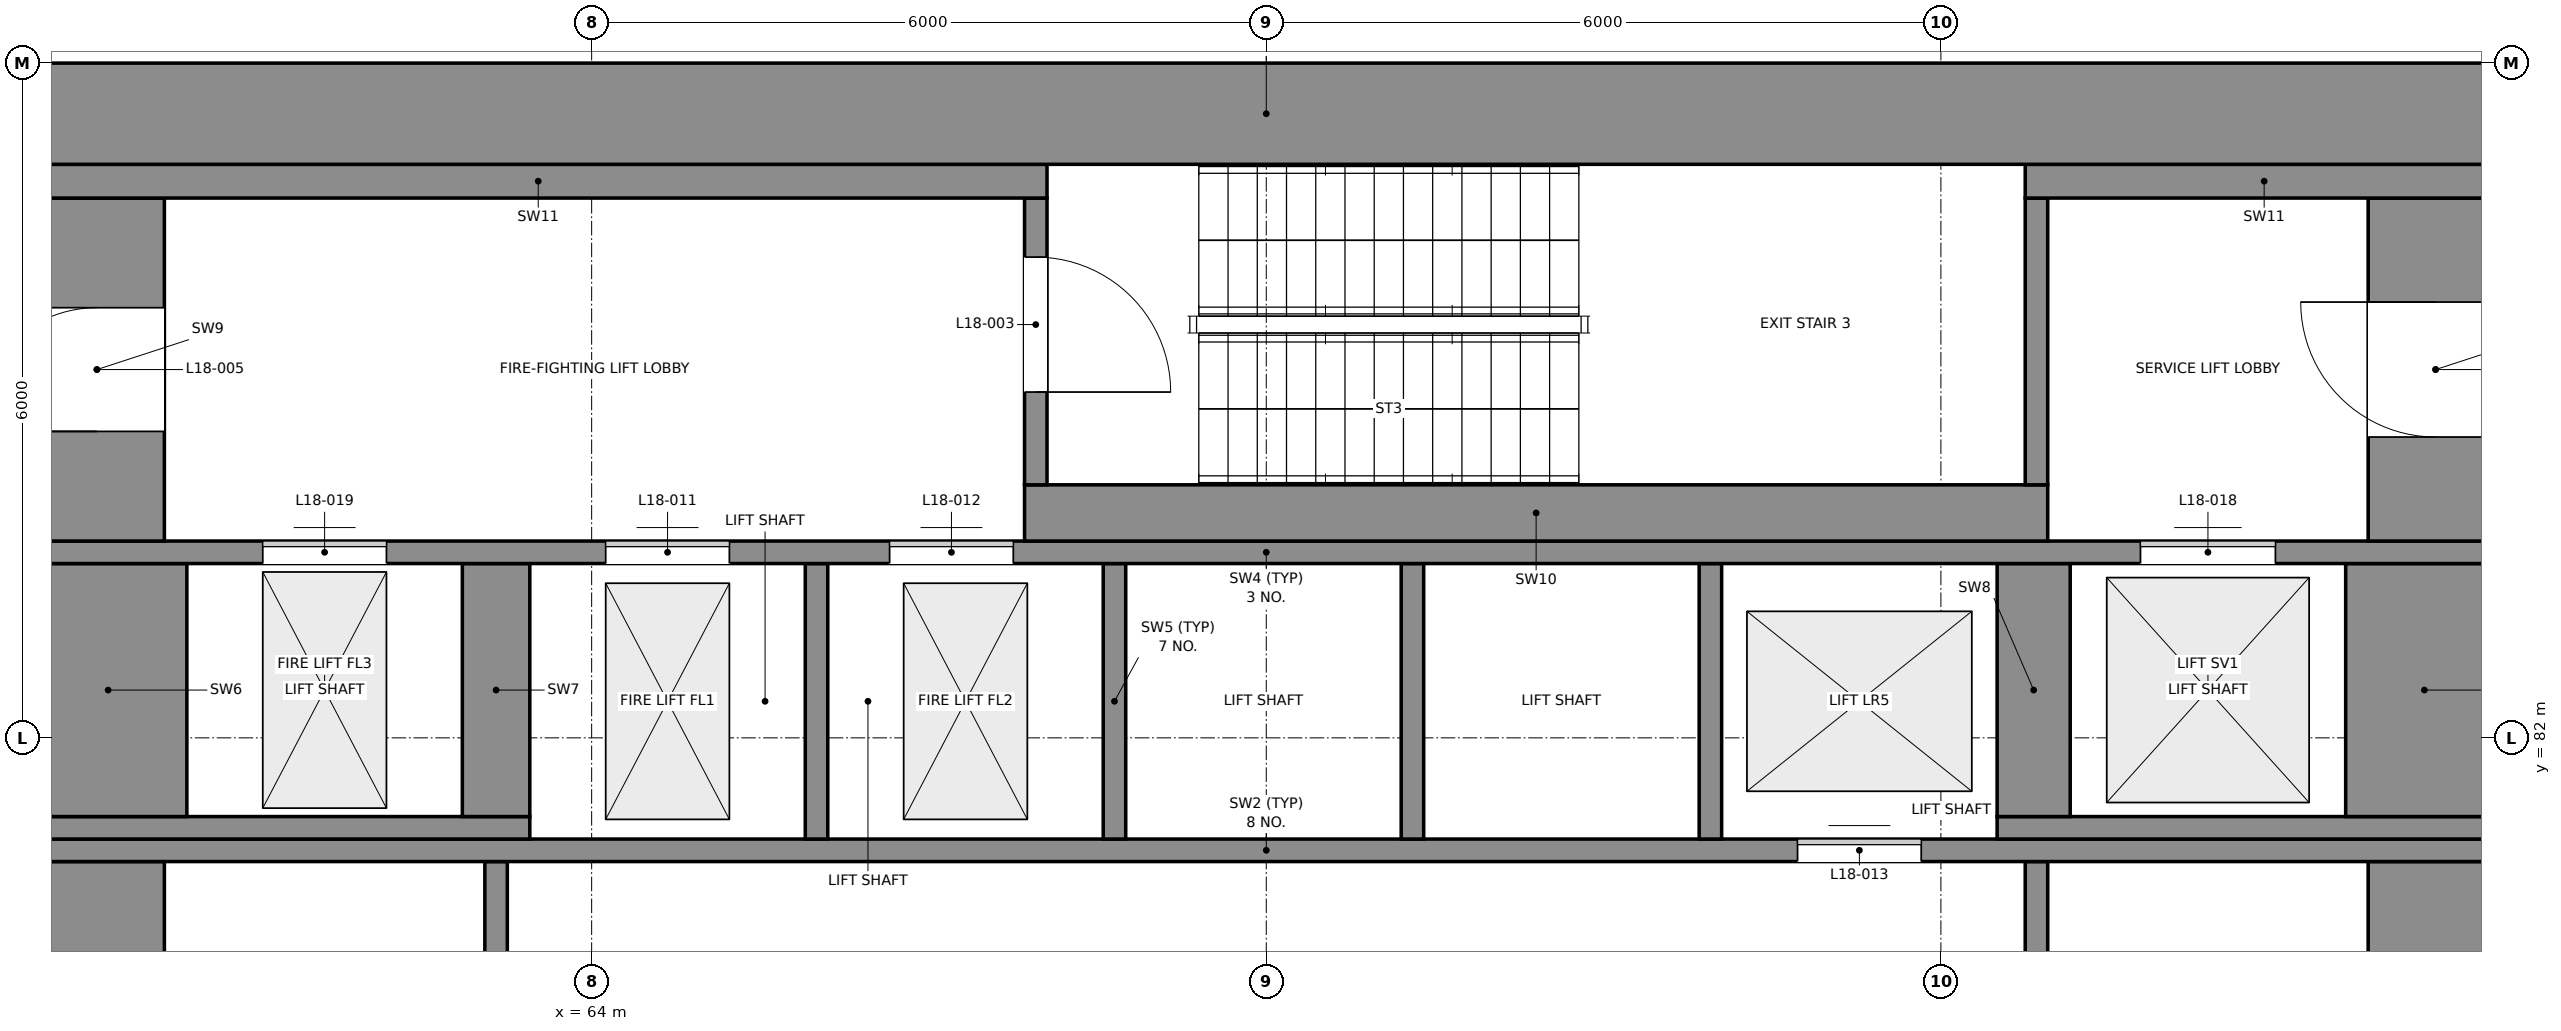
"""IFC4 building model, lengths in metres.
Left out: names, types, materials, properties, quantities, classifications, styles, units other than length and angle.
Written with IfcOpenShell. Run it as: python <this file> out.ifc"""

import sys

from ifc_helpers import new_model, si_unit, direction, frame, frame_2d, origin, place, context, subcontext, project, spatial, rectangle, extrude, element, fill, save


model = new_model("IFC4")
c1 = context("Model", 3, precision=1e-05, world=origin(), true_north=direction((0.0, 1.0)))
c2 = subcontext(c1, "Body", "Model", "MODEL_VIEW")
j1 = project(units=[si_unit("LENGTHUNIT", "METRE"), si_unit("PLANEANGLEUNIT", "RADIAN")], contexts=[c1])
p1 = place(None, origin())
s1 = spatial("IfcSite", under=j1, at=p1, CompositionType="ELEMENT")
p2 = place(p1, origin())
s2 = spatial("IfcBuilding", under=s1, at=p2, CompositionType="ELEMENT")
p3 = place(p2, frame((0.0, 0.0, 85.8)))
s3 = spatial("IfcBuildingStorey", under=s2, at=p3, CompositionType="ELEMENT", Elevation=85.8)
for number, where, z_axis, x_axis in (
    (1, (59.6, 72.2, 0.0), (0.0, 0.0, 1.0), (0.0, 1.0, 0.0)),
    (2, (80.4, 72.2, 0.0), (0.0, 0.0, 1.0), (0.0, 1.0, 0.0)),
):
    element("IfcWall", number, at=place(p3, frame(where, z_axis=z_axis, x_axis=x_axis)), inside=s3, PredefinedType="SHEAR", context=c2, shape_type="SweptSolid", body=[
        extrude(rectangle(XDim=8.7, YDim=1.2, at=frame_2d((4.35, 0.0))), origin(), (0.0, 0.0, 1.0), 5.0),
    ])
for number, where, z_axis, x_axis in (
    (3, (63.15, 77.7, 0.0), (0.0, 0.0, 1.0), (0.0, 1.0, 0.0)),
    (4, (76.85, 77.7, 0.0), (0.0, 0.0, 1.0), (0.0, 1.0, 0.0)),
):
    element("IfcWall", number, at=place(p3, frame(where, z_axis=z_axis, x_axis=x_axis)), inside=s3, PredefinedType="SHEAR", context=c2, shape_type="SweptSolid", body=[
        extrude(rectangle(XDim=3.2, YDim=0.2, at=frame_2d((1.6, 0.0))), origin(), (0.0, 0.0, 1.0), 5.0),
    ])
p4 = place(p3, frame((59.0, 81.0, 0.0), z_axis=(0.0, 0.0, 1.0), x_axis=(1.0, 0.0, 0.0)))
e5 = element("IfcWall", 5, at=p4, inside=s3, PredefinedType="SHEAR", context=c2, shape_type="SweptSolid", body=[
    extrude(rectangle(XDim=22.0, YDim=0.2, at=frame_2d((11.0, 0.0))), origin(), (0.0, 0.0, 1.0), 5.0),
])
p5 = place(p4, frame((15.725, 0.0, 0.0)))
e6 = element("IfcOpeningElement", 6, at=p5, cuts=e5, PredefinedType="OPENING", context=c2, shape_type="SweptSolid", body=[
    extrude(rectangle(XDim=1.1, YDim=2.1, at=frame_2d((0.55, 1.05))), frame((0.0, 0.11, 0.0), z_axis=(0.0, -1.0, 0.0), x_axis=(1.0, 0.0, 0.0)), (0.0, 0.0, 1.0), 0.22),
])
p6 = place(p3, frame((59.0, 81.2, 0.0), z_axis=(0.0, 0.0, 1.0), x_axis=(1.0, 0.0, 0.0)))
e7 = element("IfcWall", 7, at=p6, inside=s3, PredefinedType="SHEAR", context=c2, shape_type="SweptSolid", body=[
    extrude(rectangle(XDim=4.45, YDim=0.2, at=frame_2d((2.225, 0.0))), origin(), (0.0, 0.0, 1.0), 5.0),
])
for number, where, z_axis, x_axis in (
    (8, (66.0, 81.1, 0.0), (0.0, 0.0, 1.0), (0.0, 1.0, 0.0)),
    (9, (68.65, 81.1, 0.0), (0.0, 0.0, 1.0), (0.0, 1.0, 0.0)),
    (10, (71.3, 81.1, 0.0), (0.0, 0.0, 1.0), (0.0, 1.0, 0.0)),
    (11, (73.95, 81.1, 0.0), (0.0, 0.0, 1.0), (0.0, 1.0, 0.0)),
):
    element("IfcWall", number, at=place(p3, frame(where, z_axis=z_axis, x_axis=x_axis)), inside=s3, PredefinedType="SHEAR", context=c2, shape_type="SweptSolid", body=[
        extrude(rectangle(XDim=2.45, YDim=0.2, at=frame_2d((1.225, 0.0))), origin(), (0.0, 0.0, 1.0), 5.0),
    ])
p7 = place(p3, frame((76.5, 81.2, 0.0), z_axis=(0.0, 0.0, 1.0), x_axis=(1.0, 0.0, 0.0)))
e12 = element("IfcWall", 12, at=p7, inside=s3, PredefinedType="SHEAR", context=c2, shape_type="SweptSolid", body=[
    extrude(rectangle(XDim=4.5, YDim=0.2, at=frame_2d((2.25, 0.0))), origin(), (0.0, 0.0, 1.0), 5.0),
])
p8 = place(p3, frame((59.7, 81.3, 0.0), z_axis=(0.0, 0.0, 1.0), x_axis=(0.0, 1.0, 0.0)))
e13 = element("IfcWall", 13, at=p8, inside=s3, PredefinedType="SHEAR", context=c2, shape_type="SweptSolid", body=[
    extrude(rectangle(XDim=2.25, YDim=1.4, at=frame_2d((1.125, 0.0))), origin(), (0.0, 0.0, 1.0), 5.0),
])
p9 = place(p3, frame((63.15, 81.3, 0.0), z_axis=(0.0, 0.0, 1.0), x_axis=(0.0, 1.0, 0.0)))
e14 = element("IfcWall", 14, at=p9, inside=s3, PredefinedType="SHEAR", context=c2, shape_type="SweptSolid", body=[
    extrude(rectangle(XDim=2.25, YDim=0.6, at=frame_2d((1.125, 0.0))), origin(), (0.0, 0.0, 1.0), 5.0),
])
p10 = place(p3, frame((76.825, 81.3, 0.0), z_axis=(0.0, 0.0, 1.0), x_axis=(0.0, 1.0, 0.0)))
e15 = element("IfcWall", 15, at=p10, inside=s3, PredefinedType="SHEAR", context=c2, shape_type="SweptSolid", body=[
    extrude(rectangle(XDim=2.25, YDim=0.65, at=frame_2d((1.125, 0.0))), origin(), (0.0, 0.0, 1.0), 5.0),
])
p11 = place(p3, frame((80.3, 81.3, 0.0), z_axis=(0.0, 0.0, 1.0), x_axis=(0.0, 1.0, 0.0)))
e16 = element("IfcWall", 16, at=p11, inside=s3, PredefinedType="SHEAR", context=c2, shape_type="SweptSolid", body=[
    extrude(rectangle(XDim=2.25, YDim=1.4, at=frame_2d((1.125, 0.0))), origin(), (0.0, 0.0, 1.0), 5.0),
])
p12 = place(p3, frame((59.0, 83.65, 0.0), z_axis=(0.0, 0.0, 1.0), x_axis=(1.0, 0.0, 0.0)))
e17 = element("IfcWall", 17, at=p12, inside=s3, PredefinedType="SHEAR", context=c2, shape_type="SweptSolid", body=[
    extrude(rectangle(XDim=22.0, YDim=0.2, at=frame_2d((11.0, 0.0))), origin(), (0.0, 0.0, 1.0), 5.0),
])
p13 = place(p12, frame((5.125, 0.0, 0.0)))
e18 = element("IfcOpeningElement", 18, at=p13, cuts=e17, PredefinedType="OPENING", context=c2, shape_type="SweptSolid", body=[
    extrude(rectangle(XDim=1.1, YDim=2.1, at=frame_2d((0.55, 1.05))), frame((0.0, 0.11, 0.0), z_axis=(0.0, -1.0, 0.0), x_axis=(1.0, 0.0, 0.0)), (0.0, 0.0, 1.0), 0.22),
])
p14 = place(p12, frame((7.65, 0.0, 0.0)))
e19 = element("IfcOpeningElement", 19, at=p14, cuts=e17, PredefinedType="OPENING", context=c2, shape_type="SweptSolid", body=[
    extrude(rectangle(XDim=1.1, YDim=2.1, at=frame_2d((0.55, 1.05))), frame((0.0, 0.11, 0.0), z_axis=(0.0, -1.0, 0.0), x_axis=(1.0, 0.0, 0.0)), (0.0, 0.0, 1.0), 0.22),
])
p15 = place(p12, frame((18.775, 0.0, 0.0)))
e20 = element("IfcOpeningElement", 20, at=p15, cuts=e17, PredefinedType="OPENING", context=c2, shape_type="SweptSolid", body=[
    extrude(rectangle(XDim=1.2, YDim=2.1, at=frame_2d((0.6, 1.05))), frame((0.0, 0.11, 0.0), z_axis=(0.0, -1.0, 0.0), x_axis=(1.0, 0.0, 0.0)), (0.0, 0.0, 1.0), 0.22),
])
p16 = place(p12, frame((2.075, 0.0, 0.0)))
e21 = element("IfcOpeningElement", 21, at=p16, cuts=e17, PredefinedType="OPENING", context=c2, shape_type="SweptSolid", body=[
    extrude(rectangle(XDim=1.1, YDim=2.1, at=frame_2d((0.55, 1.05))), frame((0.0, 0.11, 0.0), z_axis=(0.0, -1.0, 0.0), x_axis=(1.0, 0.0, 0.0)), (0.0, 0.0, 1.0), 0.22),
])
p17 = place(p3, frame((59.6, 83.75, 0.0), z_axis=(0.0, 0.0, 1.0), x_axis=(0.0, 1.0, 0.0)))
e22 = element("IfcWall", 22, at=p17, inside=s3, PredefinedType="SHEAR", context=c2, shape_type="SweptSolid", body=[
    extrude(rectangle(XDim=3.05, YDim=1.2, at=frame_2d((1.525, 0.0))), origin(), (0.0, 0.0, 1.0), 5.0),
])
p18 = place(p17, frame((0.975, 0.0, 0.0)))
e23 = element("IfcOpeningElement", 23, at=p18, cuts=e22, PredefinedType="OPENING", context=c2, shape_type="SweptSolid", body=[
    extrude(rectangle(XDim=1.1, YDim=2.1, at=frame_2d((0.55, 1.05))), frame((0.0, 0.61, 0.0), z_axis=(0.0, -1.0, 0.0), x_axis=(1.0, 0.0, 0.0)), (0.0, 0.0, 1.0), 1.22),
])
p19 = place(p3, frame((67.85, 84.0, 0.0), z_axis=(0.0, 0.0, 1.0), x_axis=(1.0, 0.0, 0.0)))
e24 = element("IfcWall", 24, at=p19, inside=s3, PredefinedType="SHEAR", context=c2, shape_type="SweptSolid", body=[
    extrude(rectangle(XDim=9.1, YDim=0.5, at=frame_2d((4.55, 0.0))), origin(), (0.0, 0.0, 1.0), 5.0),
])
p20 = place(p3, frame((80.4, 83.75, 0.0), z_axis=(0.0, 0.0, 1.0), x_axis=(0.0, 1.0, 0.0)))
e25 = element("IfcWall", 25, at=p20, inside=s3, PredefinedType="SHEAR", context=c2, shape_type="SweptSolid", body=[
    extrude(rectangle(XDim=3.05, YDim=1.2, at=frame_2d((1.525, 0.0))), origin(), (0.0, 0.0, 1.0), 5.0),
])
p21 = place(p20, frame((0.925, 0.0, 0.0)))
e26 = element("IfcOpeningElement", 26, at=p21, cuts=e25, PredefinedType="OPENING", context=c2, shape_type="SweptSolid", body=[
    extrude(rectangle(XDim=1.2, YDim=2.1, at=frame_2d((0.6, 1.05))), frame((0.0, 0.61, 0.0), z_axis=(0.0, -1.0, 0.0), x_axis=(1.0, 0.0, 0.0)), (0.0, 0.0, 1.0), 1.22),
])
p22 = place(p3, frame((67.95, 84.25, 0.0), z_axis=(0.0, 0.0, 1.0), x_axis=(0.0, 1.0, 0.0)))
e27 = element("IfcWall", 27, at=p22, inside=s3, PredefinedType="SHEAR", context=c2, shape_type="SweptSolid", body=[
    extrude(rectangle(XDim=2.55, YDim=0.2, at=frame_2d((1.275, 0.0))), origin(), (0.0, 0.0, 1.0), 5.0),
])
p23 = place(p22, frame((0.825, 0.0, 0.0)))
e28 = element("IfcOpeningElement", 28, at=p23, cuts=e27, PredefinedType="OPENING", context=c2, shape_type="SweptSolid", body=[
    extrude(rectangle(XDim=1.2, YDim=2.1, at=frame_2d((0.6, 1.05))), frame((0.0, 0.11, 0.0), z_axis=(0.0, -1.0, 0.0), x_axis=(1.0, 0.0, 0.0)), (0.0, 0.0, 1.0), 0.22),
])
p24 = place(p3, frame((76.85, 84.25, 0.0), z_axis=(0.0, 0.0, 1.0), x_axis=(0.0, 1.0, 0.0)))
e29 = element("IfcWall", 29, at=p24, inside=s3, PredefinedType="SHEAR", context=c2, shape_type="SweptSolid", body=[
    extrude(rectangle(XDim=2.55, YDim=0.2, at=frame_2d((1.275, 0.0))), origin(), (0.0, 0.0, 1.0), 5.0),
])
p25 = place(p3, frame((59.0, 86.95, 0.0), z_axis=(0.0, 0.0, 1.0), x_axis=(1.0, 0.0, 0.0)))
e30 = element("IfcWall", 30, at=p25, inside=s3, PredefinedType="SHEAR", context=c2, shape_type="SweptSolid", body=[
    extrude(rectangle(XDim=9.05, YDim=0.3, at=frame_2d((4.525, 0.0))), origin(), (0.0, 0.0, 1.0), 5.0),
])
p26 = place(p3, frame((76.75, 86.95, 0.0), z_axis=(0.0, 0.0, 1.0), x_axis=(1.0, 0.0, 0.0)))
e31 = element("IfcWall", 31, at=p26, inside=s3, PredefinedType="SHEAR", context=c2, shape_type="SweptSolid", body=[
    extrude(rectangle(XDim=4.25, YDim=0.3, at=frame_2d((2.125, 0.0))), origin(), (0.0, 0.0, 1.0), 5.0),
])
p27 = place(p3, frame((59.0, 87.55, 0.0), z_axis=(0.0, 0.0, 1.0), x_axis=(1.0, 0.0, 0.0)))
e32 = element("IfcWall", 32, at=p27, inside=s3, PredefinedType="SHEAR", context=c2, shape_type="SweptSolid", body=[
    extrude(rectangle(XDim=22.0, YDim=0.9, at=frame_2d((11.0, 0.0))), origin(), (0.0, 0.0, 1.0), 5.0),
])
p28 = place(p23, frame((1.2, 0.0, 0.0), z_axis=(0.0, 0.0, 1.0), x_axis=(-1.0, 0.0, 0.0)))
e33 = element("IfcDoor", 33, at=p28, inside=s3, OperationType="SINGLE_SWING_RIGHT", PredefinedType="DOOR", context=c2, shape_type="SweptSolid", body=[
    extrude(rectangle(XDim=1.2, YDim=2.1, at=frame_2d((0.6, 1.05))), frame((0.0, 0.025, 0.0), z_axis=(0.0, -1.0, 0.0), x_axis=(1.0, 0.0, 0.0)), (0.0, 0.0, 1.0), 0.05),
])
fill(e28, e33)
p29 = place(p18, origin())
e34 = element("IfcDoor", 34, at=p29, inside=s3, OperationType="SINGLE_SWING_LEFT", PredefinedType="DOOR", context=c2, shape_type="SweptSolid", body=[
    extrude(rectangle(XDim=1.1, YDim=2.1, at=frame_2d((0.55, 1.05))), frame((0.0, 0.025, 0.0), z_axis=(0.0, -1.0, 0.0), x_axis=(1.0, 0.0, 0.0)), (0.0, 0.0, 1.0), 0.05),
])
fill(e23, e34)
p30 = place(p21, origin())
e35 = element("IfcDoor", 35, at=p30, inside=s3, OperationType="SINGLE_SWING_RIGHT", PredefinedType="DOOR", context=c2, shape_type="SweptSolid", body=[
    extrude(rectangle(XDim=1.2, YDim=2.1, at=frame_2d((0.6, 1.05))), frame((0.0, 0.025, 0.0), z_axis=(0.0, -1.0, 0.0), x_axis=(1.0, 0.0, 0.0)), (0.0, 0.0, 1.0), 0.05),
])
fill(e26, e35)
p31 = place(p13, origin())
e36 = element("IfcDoor", 36, at=p31, inside=s3, OperationType="DOUBLE_DOOR_SLIDING", PredefinedType="DOOR", context=c2, shape_type="SweptSolid", body=[
    extrude(rectangle(XDim=1.1, YDim=2.1, at=frame_2d((0.55, 1.05))), frame((0.0, 0.025, 0.0), z_axis=(0.0, -1.0, 0.0), x_axis=(1.0, 0.0, 0.0)), (0.0, 0.0, 1.0), 0.05),
])
fill(e18, e36)
p32 = place(p14, origin())
e37 = element("IfcDoor", 37, at=p32, inside=s3, OperationType="DOUBLE_DOOR_SLIDING", PredefinedType="DOOR", context=c2, shape_type="SweptSolid", body=[
    extrude(rectangle(XDim=1.1, YDim=2.1, at=frame_2d((0.55, 1.05))), frame((0.0, 0.025, 0.0), z_axis=(0.0, -1.0, 0.0), x_axis=(1.0, 0.0, 0.0)), (0.0, 0.0, 1.0), 0.05),
])
fill(e19, e37)
p33 = place(p5, origin())
e38 = element("IfcDoor", 38, at=p33, inside=s3, OperationType="DOUBLE_DOOR_SLIDING", PredefinedType="DOOR", context=c2, shape_type="SweptSolid", body=[
    extrude(rectangle(XDim=1.1, YDim=2.1, at=frame_2d((0.55, 1.05))), frame((0.0, 0.025, 0.0), z_axis=(0.0, -1.0, 0.0), x_axis=(1.0, 0.0, 0.0)), (0.0, 0.0, 1.0), 0.05),
])
fill(e6, e38)
p34 = place(p15, origin())
e39 = element("IfcDoor", 39, at=p34, inside=s3, OperationType="DOUBLE_DOOR_SLIDING", PredefinedType="DOOR", context=c2, shape_type="SweptSolid", body=[
    extrude(rectangle(XDim=1.2, YDim=2.1, at=frame_2d((0.6, 1.05))), frame((0.0, 0.025, 0.0), z_axis=(0.0, -1.0, 0.0), x_axis=(1.0, 0.0, 0.0)), (0.0, 0.0, 1.0), 0.05),
])
fill(e20, e39)
p35 = place(p16, origin())
e40 = element("IfcDoor", 40, at=p35, inside=s3, OperationType="DOUBLE_DOOR_SLIDING", PredefinedType="DOOR", context=c2, shape_type="SweptSolid", body=[
    extrude(rectangle(XDim=1.1, YDim=2.1, at=frame_2d((0.55, 1.05))), frame((0.0, 0.025, 0.0), z_axis=(0.0, -1.0, 0.0), x_axis=(1.0, 0.0, 0.0)), (0.0, 0.0, 1.0), 0.05),
])
fill(e21, e40)
save(model, sys.argv[1])
